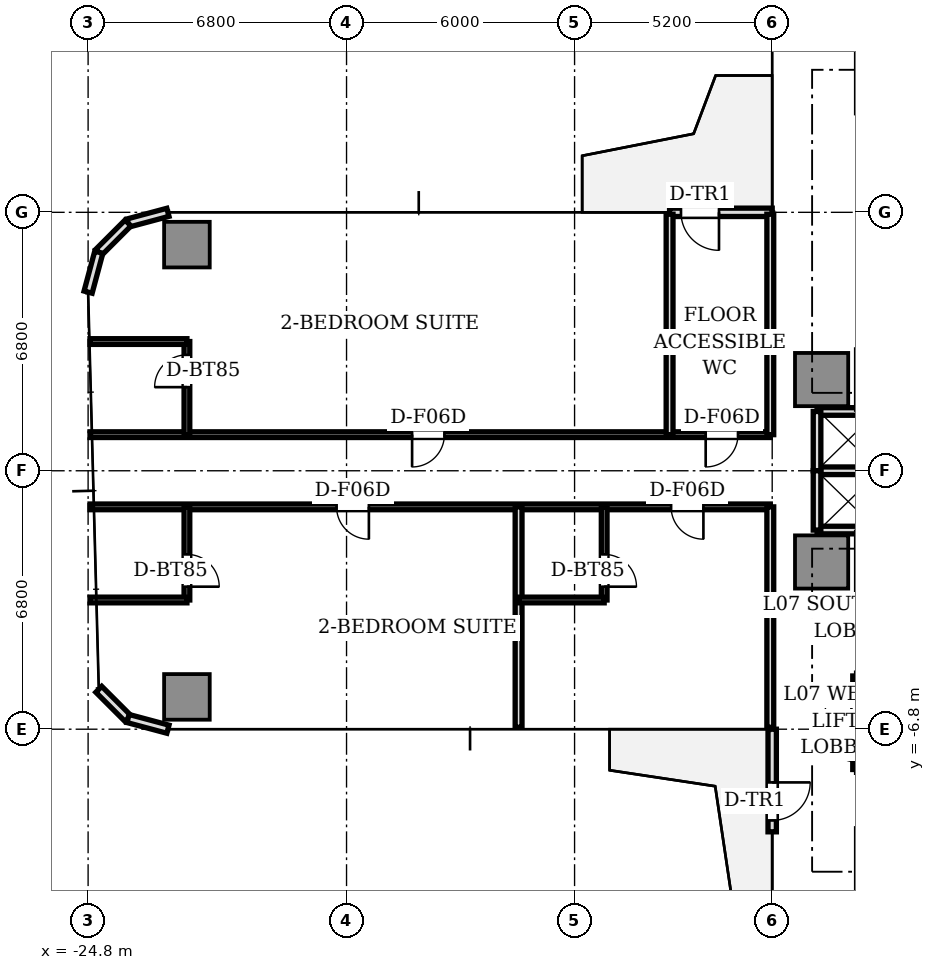
"""IFC4 building model, lengths in metres.
Left out: names, types, materials, properties, quantities, classifications, styles, units other than length and angle.
Written with IfcOpenShell. Run it as: python <this file> out.ifc"""

import sys

from ifc_helpers import new_model, si_unit, direction, frame, frame_2d, origin, origin_2d, place, context, subcontext, project, spatial, rectangle, extrude, source, transform, mapped, element, fill, save


model = new_model("IFC4")
c1 = context("Model", 3, precision=1e-05, world=origin(), true_north=direction((0.0, 1.0)))
c2 = subcontext(c1, "Body", "Model", "MODEL_VIEW")
j1 = project(units=[si_unit("LENGTHUNIT", "METRE"), si_unit("PLANEANGLEUNIT", "RADIAN")], contexts=[c1])
p1 = place(None, origin())
s1 = spatial("IfcSite", under=j1, at=p1, CompositionType="ELEMENT")
p2 = place(p1, origin())
s2 = spatial("IfcBuilding", under=s1, at=p2, CompositionType="ELEMENT")
p3 = place(p2, frame((0.0, 0.0, 29.8)))
s3 = spatial("IfcBuildingStorey", under=s2, at=p3, CompositionType="ELEMENT", Elevation=29.8)
m1 = source(origin(), c2, "Body", "SweptSolid", [
    extrude(rectangle(XDim=1.4, YDim=1.4, at=origin_2d()), origin(), (0.0, 0.0, 1.0), 3.11),
])
for number, where, z_axis, x_axis in (
    (1, (-5.5, 2.4, 0.0), (0.0, 0.0, 1.0), (1.0, 0.0, 0.0)),
    (2, (-5.5, -2.4, 0.0), (0.0, 0.0, 1.0), (1.0, 0.0, 0.0)),
):
    element("IfcColumn", number, at=place(p3, frame(where, z_axis=z_axis, x_axis=x_axis)), inside=s3, PredefinedType="COLUMN", context=c2, shape_type="MappedRepresentation", body=[
        mapped(m1, transform((0.0, 0.0, 0.0), scale=1.0)),
    ])
m2 = source(origin(), c2, "Body", "SweptSolid", [
    extrude(rectangle(XDim=1.2, YDim=1.2, at=origin_2d()), origin(), (0.0, 0.0, 1.0), 3.11),
])
for number, where, z_axis, x_axis in (
    (3, (-22.2, 5.95, 0.0), (0.0, 0.0, 1.0), (1.0, 0.0, 0.0)),
    (4, (-22.2, -5.95, 0.0), (0.0, 0.0, 1.0), (1.0, 0.0, 0.0)),
):
    element("IfcColumn", number, at=place(p3, frame(where, z_axis=z_axis, x_axis=x_axis)), inside=s3, PredefinedType="COLUMN", context=c2, shape_type="MappedRepresentation", body=[
        mapped(m2, transform((0.0, 0.0, 0.0), scale=1.0)),
    ])
p4 = place(p3, frame((-6.8, 6.8, 0.0), z_axis=(0.0, 0.0, 1.0), x_axis=(-1.0, 0.0, 0.0)))
e5 = element("IfcWall", 5, at=p4, inside=s3, PredefinedType="STANDARD", context=c2, shape_type="SweptSolid", body=[
    extrude(rectangle(XDim=2.7, YDim=0.22, at=frame_2d((1.35, 0.0))), origin(), (0.0, 0.0, 1.0), 3.11),
])
p5 = place(p4, frame((1.4, 0.0, 0.0)))
e6 = element("IfcOpeningElement", 6, at=p5, cuts=e5, PredefinedType="OPENING", context=c2, shape_type="SweptSolid", body=[
    extrude(rectangle(XDim=1.0, YDim=2.2, at=frame_2d((0.5, 1.1))), frame((0.0, 0.12, 0.0), z_axis=(0.0, -1.0, 0.0), x_axis=(1.0, 0.0, 0.0)), (0.0, 0.0, 1.0), 0.24),
])
for number, where, z_axis, x_axis in (
    (7, (-22.7, 6.8, 0.0), (0.0, 0.0, 1.0), (-0.966, -0.259, 0.0)),
    (8, (-23.75, 6.519, 0.0), (0.0, 0.0, 1.0), (-0.707, -0.707, 0.0)),
    (9, (-24.519, 5.75, 0.0), (0.0, 0.0, 1.0), (-0.259, -0.966, 0.0)),
    (10, (-24.519, -5.75, 0.0), (0.0, 0.0, 1.0), (0.707, -0.707, 0.0)),
    (11, (-23.75, -6.519, 0.0), (0.0, 0.0, 1.0), (0.966, -0.259, 0.0)),
):
    element("IfcWall", number, at=place(p3, frame(where, z_axis=z_axis, x_axis=x_axis)), inside=s3, PredefinedType="STANDARD", context=c2, shape_type="SweptSolid", body=[
        extrude(rectangle(XDim=1.087, YDim=0.22, at=frame_2d((0.543, 0.0))), origin(), (0.0, 0.0, 1.0), 3.11),
    ])
p6 = place(p3, frame((-6.8, -6.8, 0.0), z_axis=(0.0, 0.0, 1.0), x_axis=(0.0, -1.0, 0.0)))
e12 = element("IfcWall", 12, at=p6, inside=s3, PredefinedType="STANDARD", context=c2, shape_type="SweptSolid", body=[
    extrude(rectangle(XDim=2.7, YDim=0.22, at=frame_2d((1.35, 0.0))), origin(), (0.0, 0.0, 1.0), 3.11),
])
p7 = place(p6, frame((1.4, 0.0, 0.0)))
e13 = element("IfcOpeningElement", 13, at=p7, cuts=e12, PredefinedType="OPENING", context=c2, shape_type="SweptSolid", body=[
    extrude(rectangle(XDim=1.0, YDim=2.2, at=frame_2d((0.5, 1.1))), frame((0.0, 0.12, 0.0), z_axis=(0.0, -1.0, 0.0), x_axis=(1.0, 0.0, 0.0)), (0.0, 0.0, 1.0), 0.24),
])
for number, where, z_axis, x_axis in (
    (14, (-5.62, 1.56, 0.0), (0.0, 0.0, 1.0), (1.0, 0.0, 0.0)),
    (15, (-5.62, -1.56, 0.0), (0.0, 0.0, 1.0), (1.0, 0.0, 0.0)),
    (16, (-5.62, 0.0, 0.0), (0.0, 0.0, 1.0), (1.0, 0.0, 0.0)),
):
    element("IfcWall", number, at=place(p3, frame(where, z_axis=z_axis, x_axis=x_axis)), inside=s3, PredefinedType="SOLIDWALL", context=c2, shape_type="SweptSolid", body=[
        extrude(rectangle(XDim=1.64, YDim=0.2, at=frame_2d((0.82, 0.0))), origin(), (0.0, 0.0, 1.0), 2.66),
    ])
for number, where, z_axis, x_axis in (
    (17, (-5.62, 0.0, 0.0), (0.0, 0.0, 1.0), (0.0, 1.0, 0.0)),
    (18, (-5.62, -1.56, 0.0), (0.0, 0.0, 1.0), (0.0, 1.0, 0.0)),
):
    element("IfcWall", number, at=place(p3, frame(where, z_axis=z_axis, x_axis=x_axis)), inside=s3, PredefinedType="SOLIDWALL", context=c2, shape_type="SweptSolid", body=[
        extrude(rectangle(XDim=1.56, YDim=0.2, at=frame_2d((0.78, 0.0))), origin(), (0.0, 0.0, 1.0), 2.66),
    ])
p8 = place(p3, frame((-4.58, -7.86, 0.0), z_axis=(0.0, 0.0, 1.0), x_axis=(0.0, 1.0, 0.0)))
e19 = element("IfcWall", 19, at=p8, inside=s3, PredefinedType="SOLIDWALL", context=c2, shape_type="SweptSolid", body=[
    extrude(rectangle(XDim=2.46, YDim=0.2, at=frame_2d((1.23, 0.0))), origin(), (0.0, 0.0, 1.0), 2.66),
])
p9 = place(p8, frame((0.2, 0.0, 0.0)))
e20 = element("IfcOpeningElement", 20, at=p9, cuts=e19, PredefinedType="OPENING", context=c2, shape_type="SweptSolid", body=[
    extrude(rectangle(XDim=0.85, YDim=2.1, at=frame_2d((0.425, 1.05))), frame((0.0, 0.11, 0.0), z_axis=(0.0, -1.0, 0.0), x_axis=(1.0, 0.0, 0.0)), (0.0, 0.0, 1.0), 0.22),
])
p10 = place(p8, frame((1.38, 0.0, 0.0)))
e21 = element("IfcOpeningElement", 21, at=p10, cuts=e19, PredefinedType="OPENING", context=c2, shape_type="SweptSolid", body=[
    extrude(rectangle(XDim=0.85, YDim=2.1, at=frame_2d((0.425, 1.05))), frame((0.0, 0.11, 0.0), z_axis=(0.0, -1.0, 0.0), x_axis=(1.0, 0.0, 0.0)), (0.0, 0.0, 1.0), 0.22),
])
p11 = place(p3, frame((-6.85, -0.95, 0.0), z_axis=(0.0, 0.0, 1.0), x_axis=(-1.0, 0.0, 0.0)))
e22 = element("IfcWall", 22, at=p11, inside=s3, PredefinedType="PARTITIONING", context=c2, shape_type="SweptSolid", body=[
    extrude(rectangle(XDim=17.9, YDim=0.15, at=frame_2d((8.95, 0.0))), origin(), (0.0, 0.0, 1.0), 2.66),
])
p12 = place(p11, frame((1.76, 0.0, 0.0)))
e23 = element("IfcOpeningElement", 23, at=p12, cuts=e22, PredefinedType="OPENING", context=c2, shape_type="SweptSolid", body=[
    extrude(rectangle(XDim=0.85, YDim=2.1, at=frame_2d((0.425, 1.05))), frame((0.0, 0.085, 0.0), z_axis=(0.0, -1.0, 0.0), x_axis=(1.0, 0.0, 0.0)), (0.0, 0.0, 1.0), 0.17),
])
p13 = place(p11, frame((10.562, 0.0, 0.0)))
e24 = element("IfcOpeningElement", 24, at=p13, cuts=e22, PredefinedType="OPENING", context=c2, shape_type="SweptSolid", body=[
    extrude(rectangle(XDim=0.85, YDim=2.1, at=frame_2d((0.425, 1.05))), frame((0.0, 0.085, 0.0), z_axis=(0.0, -1.0, 0.0), x_axis=(1.0, 0.0, 0.0)), (0.0, 0.0, 1.0), 0.17),
])
p14 = place(p3, frame((-6.85, 0.95, 0.0), z_axis=(0.0, 0.0, 1.0), x_axis=(-1.0, 0.0, 0.0)))
e25 = element("IfcWall", 25, at=p14, inside=s3, PredefinedType="PARTITIONING", context=c2, shape_type="SweptSolid", body=[
    extrude(rectangle(XDim=17.9, YDim=0.15, at=frame_2d((8.95, 0.0))), origin(), (0.0, 0.0, 1.0), 2.66),
])
p15 = place(p14, frame((0.85, 0.0, 0.0)))
e26 = element("IfcOpeningElement", 26, at=p15, cuts=e25, PredefinedType="OPENING", context=c2, shape_type="SweptSolid", body=[
    extrude(rectangle(XDim=0.85, YDim=2.1, at=frame_2d((0.425, 1.05))), frame((0.0, 0.085, 0.0), z_axis=(0.0, -1.0, 0.0), x_axis=(1.0, 0.0, 0.0)), (0.0, 0.0, 1.0), 0.17),
])
p16 = place(p14, frame((8.575, 0.0, 0.0)))
e27 = element("IfcOpeningElement", 27, at=p16, cuts=e25, PredefinedType="OPENING", context=c2, shape_type="SweptSolid", body=[
    extrude(rectangle(XDim=0.85, YDim=2.1, at=frame_2d((0.425, 1.05))), frame((0.0, 0.085, 0.0), z_axis=(0.0, -1.0, 0.0), x_axis=(1.0, 0.0, 0.0)), (0.0, 0.0, 1.0), 0.17),
])
for number, where, z_axis, x_axis in (
    (28, (-6.85, -0.95, 0.0), (0.0, 0.0, 1.0), (0.0, -1.0, 0.0)),
    (29, (-6.85, 6.75, 0.0), (0.0, 0.0, 1.0), (0.0, -1.0, 0.0)),
    (30, (-13.473, -0.95, 0.0), (0.0, 0.0, 1.0), (0.0, -1.0, 0.0)),
):
    element("IfcWall", number, at=place(p3, frame(where, z_axis=z_axis, x_axis=x_axis)), inside=s3, PredefinedType="PARTITIONING", context=c2, shape_type="SweptSolid", body=[
        extrude(rectangle(XDim=5.8, YDim=0.18, at=frame_2d((2.9, 0.0))), origin(), (0.0, 0.0, 1.0), 2.66),
    ])
p17 = place(p3, frame((-11.221, -0.95, 0.0), z_axis=(0.0, 0.0, 1.0), x_axis=(0.0, -1.0, 0.0)))
e31 = element("IfcWall", 31, at=p17, inside=s3, PredefinedType="PARTITIONING", context=c2, shape_type="SweptSolid", body=[
    extrude(rectangle(XDim=2.45, YDim=0.15, at=frame_2d((1.225, 0.0))), origin(), (0.0, 0.0, 1.0), 2.66),
])
p18 = place(p17, frame((1.25, 0.0, 0.0)))
e32 = element("IfcOpeningElement", 32, at=p18, cuts=e31, PredefinedType="OPENING", context=c2, shape_type="SweptSolid", body=[
    extrude(rectangle(XDim=0.85, YDim=2.1, at=frame_2d((0.425, 1.05))), frame((0.0, 0.085, 0.0), z_axis=(0.0, -1.0, 0.0), x_axis=(1.0, 0.0, 0.0)), (0.0, 0.0, 1.0), 0.17),
])
p19 = place(p3, frame((-11.221, -3.4, 0.0), z_axis=(0.0, 0.0, 1.0), x_axis=(-1.0, 0.0, 0.0)))
e33 = element("IfcWall", 33, at=p19, inside=s3, PredefinedType="PARTITIONING", context=c2, shape_type="SweptSolid", body=[
    extrude(rectangle(XDim=2.252, YDim=0.15, at=frame_2d((1.126, 0.0))), origin(), (0.0, 0.0, 1.0), 2.63),
])
p20 = place(p3, frame((-22.2, -0.95, 0.0), z_axis=(0.0, 0.0, 1.0), x_axis=(0.0, -1.0, 0.0)))
e34 = element("IfcWall", 34, at=p20, inside=s3, PredefinedType="PARTITIONING", context=c2, shape_type="SweptSolid", body=[
    extrude(rectangle(XDim=2.45, YDim=0.15, at=frame_2d((1.225, 0.0))), origin(), (0.0, 0.0, 1.0), 2.58),
])
p21 = place(p20, frame((1.25, 0.0, 0.0)))
e35 = element("IfcOpeningElement", 35, at=p21, cuts=e34, PredefinedType="OPENING", context=c2, shape_type="SweptSolid", body=[
    extrude(rectangle(XDim=0.85, YDim=2.1, at=frame_2d((0.425, 1.05))), frame((0.0, 0.085, 0.0), z_axis=(0.0, -1.0, 0.0), x_axis=(1.0, 0.0, 0.0)), (0.0, 0.0, 1.0), 0.17),
])
p22 = place(p3, frame((-22.2, -3.4, 0.0), z_axis=(0.0, 0.0, 1.0), x_axis=(-1.0, 0.0, 0.0)))
e36 = element("IfcWall", 36, at=p22, inside=s3, PredefinedType="PARTITIONING", context=c2, shape_type="SweptSolid", body=[
    extrude(rectangle(XDim=2.55, YDim=0.15, at=frame_2d((1.275, 0.0))), origin(), (0.0, 0.0, 1.0), 2.66),
])
p23 = place(p3, frame((-9.5, 0.95, 0.0), z_axis=(0.0, 0.0, 1.0), x_axis=(0.0, 1.0, 0.0)))
e37 = element("IfcWall", 37, at=p23, inside=s3, PredefinedType="PARTITIONING", context=c2, shape_type="SweptSolid", body=[
    extrude(rectangle(XDim=5.8, YDim=0.18, at=frame_2d((2.9, 0.0))), origin(), (0.0, 0.0, 1.0), 2.66),
])
p24 = place(p3, frame((-22.2, 0.95, 0.0), z_axis=(0.0, 0.0, 1.0), x_axis=(0.0, 1.0, 0.0)))
e38 = element("IfcWall", 38, at=p24, inside=s3, PredefinedType="PARTITIONING", context=c2, shape_type="SweptSolid", body=[
    extrude(rectangle(XDim=2.45, YDim=0.15, at=frame_2d((1.225, 0.0))), origin(), (0.0, 0.0, 1.0), 2.58),
])
p25 = place(p24, frame((1.25, 0.0, 0.0)))
e39 = element("IfcOpeningElement", 39, at=p25, cuts=e38, PredefinedType="OPENING", context=c2, shape_type="SweptSolid", body=[
    extrude(rectangle(XDim=0.85, YDim=2.1, at=frame_2d((0.425, 1.05))), frame((0.0, 0.085, 0.0), z_axis=(0.0, -1.0, 0.0), x_axis=(1.0, 0.0, 0.0)), (0.0, 0.0, 1.0), 0.17),
])
p26 = place(p3, frame((-22.2, 3.4, 0.0), z_axis=(0.0, 0.0, 1.0), x_axis=(-1.0, 0.0, 0.0)))
e40 = element("IfcWall", 40, at=p26, inside=s3, PredefinedType="PARTITIONING", context=c2, shape_type="SweptSolid", body=[
    extrude(rectangle(XDim=2.55, YDim=0.15, at=frame_2d((1.275, 0.0))), origin(), (0.0, 0.0, 1.0), 2.66),
])
m3 = source(origin(), c2, "Body", "SweptSolid", [
    extrude(rectangle(XDim=1.0, YDim=0.05, at=origin_2d()), origin(), (0.0, 0.0, 1.0), 2.2),
])
p27 = place(p5, frame((0.5, 0.0, 0.0)))
e41 = element("IfcDoor", 41, at=p27, inside=s3, OperationType="SINGLE_SWING_LEFT", PredefinedType="DOOR", context=c2, shape_type="MappedRepresentation", body=[
    mapped(m3, transform((0.0, 0.0, 0.0), scale=1.0)),
])
fill(e6, e41)
p28 = place(p7, frame((0.5, 0.0, 0.0)))
e42 = element("IfcDoor", 42, at=p28, inside=s3, OperationType="SINGLE_SWING_LEFT", PredefinedType="DOOR", context=c2, shape_type="MappedRepresentation", body=[
    mapped(m3, transform((0.0, 0.0, 0.0), scale=1.0)),
])
fill(e13, e42)
m4 = source(origin(), c2, "Body", "SweptSolid", [
    extrude(rectangle(XDim=0.85, YDim=0.05, at=origin_2d()), origin(), (0.0, 0.0, 1.0), 2.1),
])
p29 = place(p18, frame((0.425, 0.0, 0.0)))
e43 = element("IfcDoor", 43, at=p29, inside=s3, OperationType="SINGLE_SWING_RIGHT", PredefinedType="DOOR", context=c2, shape_type="MappedRepresentation", body=[
    mapped(m4, transform((0.0, 0.0, 0.0), scale=1.0)),
])
fill(e32, e43)
p30 = place(p12, frame((0.425, 0.0, 0.0)))
e44 = element("IfcDoor", 44, at=p30, inside=s3, OperationType="SINGLE_SWING_LEFT", PredefinedType="DOOR", context=c2, shape_type="MappedRepresentation", body=[
    mapped(m4, transform((0.0, 0.0, 0.0), scale=1.0)),
])
fill(e23, e44)
p31 = place(p21, frame((0.425, 0.0, 0.0)))
e45 = element("IfcDoor", 45, at=p31, inside=s3, OperationType="SINGLE_SWING_RIGHT", PredefinedType="DOOR", context=c2, shape_type="MappedRepresentation", body=[
    mapped(m4, transform((0.0, 0.0, 0.0), scale=1.0)),
])
fill(e35, e45)
p32 = place(p13, frame((0.425, 0.0, 0.0)))
e46 = element("IfcDoor", 46, at=p32, inside=s3, OperationType="SINGLE_SWING_LEFT", PredefinedType="DOOR", context=c2, shape_type="MappedRepresentation", body=[
    mapped(m4, transform((0.0, 0.0, 0.0), scale=1.0)),
])
fill(e24, e46)
p33 = place(p15, frame((0.425, 0.0, 0.0)))
e47 = element("IfcDoor", 47, at=p33, inside=s3, OperationType="SINGLE_SWING_RIGHT", PredefinedType="DOOR", context=c2, shape_type="MappedRepresentation", body=[
    mapped(m4, transform((0.0, 0.0, 0.0), scale=1.0)),
])
fill(e26, e47)
p34 = place(p25, frame((0.425, 0.0, 0.0)))
e48 = element("IfcDoor", 48, at=p34, inside=s3, OperationType="SINGLE_SWING_LEFT", PredefinedType="DOOR", context=c2, shape_type="MappedRepresentation", body=[
    mapped(m4, transform((0.0, 0.0, 0.0), scale=1.0)),
])
fill(e39, e48)
p35 = place(p16, frame((0.425, 0.0, 0.0)))
e49 = element("IfcDoor", 49, at=p35, inside=s3, OperationType="SINGLE_SWING_RIGHT", PredefinedType="DOOR", context=c2, shape_type="MappedRepresentation", body=[
    mapped(m4, transform((0.0, 0.0, 0.0), scale=1.0)),
])
fill(e27, e49)
save(model, sys.argv[1])
